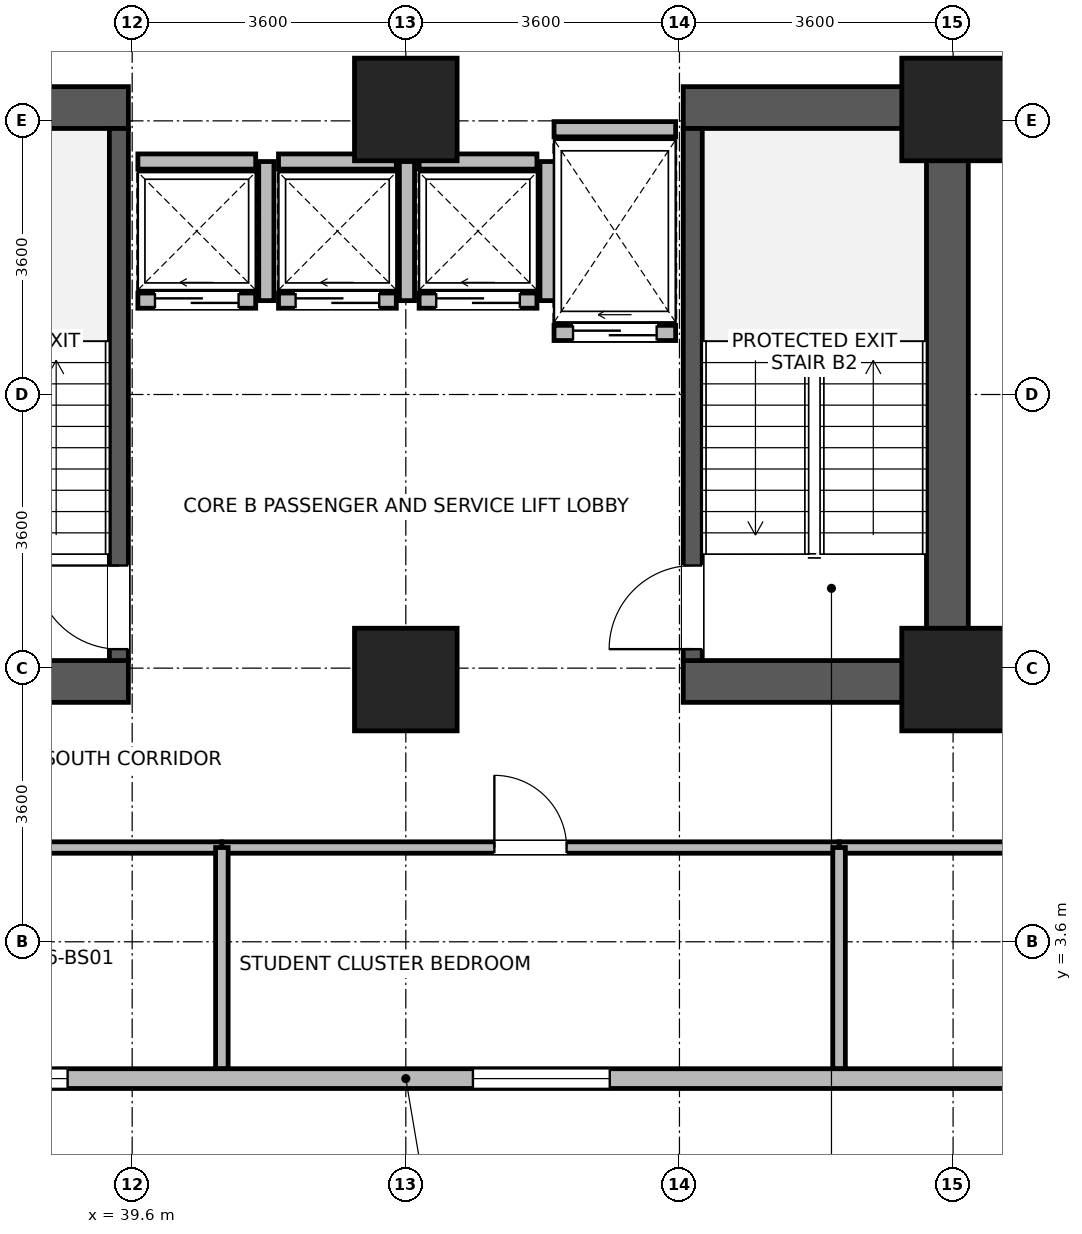
"""IFC4 building model, lengths in metres.
Left out: names, types, materials, properties, quantities, classifications, styles, units other than length and angle.
Written with IfcOpenShell. Run it as: python <this file> out.ifc"""

import sys

from ifc_helpers import new_model, si_unit, direction, frame, frame_2d, origin, origin_2d, place, context, subcontext, project, spatial, rectangle, extrude, source, transform, mapped, element, fill, save


model = new_model("IFC4")
c1 = context("Model", 3, precision=1e-05, world=origin(), true_north=direction((0.0, 1.0)))
c2 = subcontext(c1, "Body", "Model", "MODEL_VIEW")
j1 = project(units=[si_unit("LENGTHUNIT", "METRE"), si_unit("PLANEANGLEUNIT", "RADIAN")], contexts=[c1])
p1 = place(None, origin())
s1 = spatial("IfcSite", under=j1, at=p1, CompositionType="ELEMENT")
p2 = place(p1, origin())
s2 = spatial("IfcBuilding", under=s1, at=p2, CompositionType="ELEMENT")
p3 = place(p2, frame((0.0, 0.0, 29.0)))
s3 = spatial("IfcBuildingStorey", under=s2, at=p3, CompositionType="ELEMENT", Elevation=29.0)
p4 = place(p3, frame((50.325, 6.75, 0.0), z_axis=(0.0, 0.0, 1.0), x_axis=(0.0, 1.0, 0.0)))
e1 = element("IfcWall", 1, at=p4, inside=s3, PredefinedType="SHEAR", context=c2, shape_type="SweptSolid", body=[
    extrude(rectangle(XDim=8.1, YDim=0.55, at=frame_2d((4.05, 0.0))), origin(), (0.0, 0.0, 1.0), 3.45),
])
for number, where, z_axis, x_axis in (
    (2, (36.35, 7.025, 0.0), (0.0, 0.0, 1.0), (1.0, 0.0, 0.0)),
    (3, (46.85, 7.025, 0.0), (0.0, 0.0, 1.0), (1.0, 0.0, 0.0)),
    (4, (36.35, 14.575, 0.0), (0.0, 0.0, 1.0), (1.0, 0.0, 0.0)),
    (5, (46.85, 14.575, 0.0), (0.0, 0.0, 1.0), (1.0, 0.0, 0.0)),
):
    element("IfcWall", number, at=place(p3, frame(where, z_axis=z_axis, x_axis=x_axis)), inside=s3, PredefinedType="SHEAR", context=c2, shape_type="SweptSolid", body=[
        extrude(rectangle(XDim=3.2, YDim=0.55, at=frame_2d((1.6, 0.0))), origin(), (0.0, 0.0, 1.0), 3.45),
    ])
p5 = place(p3, frame((39.425, 7.3, 0.0), z_axis=(0.0, 0.0, 1.0), x_axis=(0.0, 1.0, 0.0)))
e6 = element("IfcWall", 6, at=p5, inside=s3, PredefinedType="SHEAR", context=c2, shape_type="SweptSolid", body=[
    extrude(rectangle(XDim=7.0, YDim=0.25, at=frame_2d((3.5, 0.0))), origin(), (0.0, 0.0, 1.0), 3.45),
])
p6 = place(p5, frame((0.15, 0.0, 0.0)))
e7 = element("IfcOpeningElement", 7, at=p6, cuts=e6, PredefinedType="OPENING", context=c2, shape_type="SweptSolid", body=[
    extrude(rectangle(XDim=1.1, YDim=2.08, at=frame_2d((0.55, 1.04))), frame((0.0, 0.135, 0.0), z_axis=(0.0, -1.0, 0.0), x_axis=(1.0, 0.0, 0.0)), (0.0, 0.0, 1.0), 0.27),
])
p7 = place(p3, frame((46.975, 7.3, 0.0), z_axis=(0.0, 0.0, 1.0), x_axis=(0.0, 1.0, 0.0)))
e8 = element("IfcWall", 8, at=p7, inside=s3, PredefinedType="SHEAR", context=c2, shape_type="SweptSolid", body=[
    extrude(rectangle(XDim=7.0, YDim=0.25, at=frame_2d((3.5, 0.0))), origin(), (0.0, 0.0, 1.0), 3.45),
])
p8 = place(p7, frame((0.15, 0.0, 0.0)))
e9 = element("IfcOpeningElement", 9, at=p8, cuts=e8, PredefinedType="OPENING", context=c2, shape_type="SweptSolid", body=[
    extrude(rectangle(XDim=1.1, YDim=2.08, at=frame_2d((0.55, 1.04))), frame((0.0, 0.135, 0.0), z_axis=(0.0, -1.0, 0.0), x_axis=(1.0, 0.0, 0.0)), (0.0, 0.0, 1.0), 0.27),
])
m1 = source(origin(), c2, "Body", "SweptSolid", [
    extrude(rectangle(XDim=1.35, YDim=1.35, at=origin_2d()), origin(), (0.0, 0.0, 1.0), 3.7),
])
for number, where, z_axis, x_axis in (
    (10, (43.2, 7.05, 0.0), (0.0, 0.0, 1.0), (1.0, 0.0, 0.0)),
    (11, (43.2, 14.55, 0.0), (0.0, 0.0, 1.0), (1.0, 0.0, 0.0)),
    (12, (50.4, 7.05, 0.0), (0.0, 0.0, 1.0), (1.0, 0.0, 0.0)),
    (13, (50.4, 14.55, 0.0), (0.0, 0.0, 1.0), (1.0, 0.0, 0.0)),
):
    element("IfcColumn", number, at=place(p3, frame(where, z_axis=z_axis, x_axis=x_axis)), inside=s3, PredefinedType="COLUMN", context=c2, shape_type="MappedRepresentation", body=[
        mapped(m1, transform((0.0, 0.0, 0.0), x_axis=(1.0, 0.0, 0.0), y_axis=(0.0, 1.0, 0.0), z_axis=(0.0, 0.0, 1.0), scale=1.0)),
    ])
p9 = place(p3, frame((57.465, 1.8, 0.0), z_axis=(0.0, 0.0, 1.0), x_axis=(-1.0, 0.0, 0.0)))
e14 = element("IfcWall", 14, at=p9, inside=s3, PredefinedType="STANDARD", context=c2, shape_type="SweptSolid", body=[
    extrude(rectangle(XDim=28.53, YDim=0.26, at=frame_2d((14.265, 0.0))), origin(), (0.0, 0.0, 1.0), 3.43),
])
p10 = place(p9, frame((0.883, 0.0, 0.85)))
e15 = element("IfcOpeningElement", 15, at=p10, cuts=e14, PredefinedType="OPENING", context=c2, shape_type="SweptSolid", body=[
    extrude(rectangle(XDim=1.8, YDim=1.85, at=frame_2d((0.9, 0.925))), frame((0.0, 0.14, 0.0), z_axis=(0.0, -1.0, 0.0), x_axis=(1.0, 0.0, 0.0)), (0.0, 0.0, 1.0), 0.28),
])
p11 = place(p9, frame((4.449, 0.0, 0.85)))
e16 = element("IfcOpeningElement", 16, at=p11, cuts=e14, PredefinedType="OPENING", context=c2, shape_type="SweptSolid", body=[
    extrude(rectangle(XDim=1.8, YDim=1.85, at=frame_2d((0.9, 0.925))), frame((0.0, 0.14, 0.0), z_axis=(0.0, -1.0, 0.0), x_axis=(1.0, 0.0, 0.0)), (0.0, 0.0, 1.0), 0.28),
])
p12 = place(p9, frame((11.582, 0.0, 0.85)))
e17 = element("IfcOpeningElement", 17, at=p12, cuts=e14, PredefinedType="OPENING", context=c2, shape_type="SweptSolid", body=[
    extrude(rectangle(XDim=1.8, YDim=1.85, at=frame_2d((0.9, 0.925))), frame((0.0, 0.14, 0.0), z_axis=(0.0, -1.0, 0.0), x_axis=(1.0, 0.0, 0.0)), (0.0, 0.0, 1.0), 0.28),
])
p13 = place(p9, frame((18.714, 0.0, 0.85)))
e18 = element("IfcOpeningElement", 18, at=p13, cuts=e14, PredefinedType="OPENING", context=c2, shape_type="SweptSolid", body=[
    extrude(rectangle(XDim=1.8, YDim=1.85, at=frame_2d((0.9, 0.925))), frame((0.0, 0.14, 0.0), z_axis=(0.0, -1.0, 0.0), x_axis=(1.0, 0.0, 0.0)), (0.0, 0.0, 1.0), 0.28),
])
p14 = place(p9, frame((22.281, 0.0, 0.85)))
e19 = element("IfcOpeningElement", 19, at=p14, cuts=e14, PredefinedType="OPENING", context=c2, shape_type="SweptSolid", body=[
    extrude(rectangle(XDim=1.8, YDim=1.85, at=frame_2d((0.9, 0.925))), frame((0.0, 0.14, 0.0), z_axis=(0.0, -1.0, 0.0), x_axis=(1.0, 0.0, 0.0)), (0.0, 0.0, 1.0), 0.28),
])
p15 = place(p9, frame((25.847, 0.0, 0.85)))
e20 = element("IfcOpeningElement", 20, at=p15, cuts=e14, PredefinedType="OPENING", context=c2, shape_type="SweptSolid", body=[
    extrude(rectangle(XDim=1.8, YDim=1.85, at=frame_2d((0.9, 0.925))), frame((0.0, 0.14, 0.0), z_axis=(0.0, -1.0, 0.0), x_axis=(1.0, 0.0, 0.0)), (0.0, 0.0, 1.0), 0.28),
])
p16 = place(p3, frame((39.675, 12.035, 0.0), z_axis=(0.0, 0.0, 1.0), x_axis=(1.0, 0.0, 0.0)))
e21 = element("IfcWall", 21, at=p16, inside=s3, PredefinedType="PARTITIONING", context=c2, shape_type="SweptSolid", body=[
    extrude(rectangle(XDim=1.55, YDim=0.2, at=frame_2d((0.775, 0.0))), origin(), (0.0, 0.0, 1.0), 3.43),
])
p17 = place(p16, frame((0.225, 0.0, 0.0)))
e22 = element("IfcOpeningElement", 22, at=p17, cuts=e21, PredefinedType="OPENING", context=c2, shape_type="SweptSolid", body=[
    extrude(rectangle(XDim=1.1, YDim=2.12, at=frame_2d((0.55, 1.06))), frame((0.0, 0.11, 0.0), z_axis=(0.0, -1.0, 0.0), x_axis=(1.0, 0.0, 0.0)), (0.0, 0.0, 1.0), 0.22),
])
p18 = place(p3, frame((39.675, 13.865, 0.0), z_axis=(0.0, 0.0, 1.0), x_axis=(1.0, 0.0, 0.0)))
e23 = element("IfcWall", 23, at=p18, inside=s3, PredefinedType="PARTITIONING", context=c2, shape_type="SweptSolid", body=[
    extrude(rectangle(XDim=1.55, YDim=0.2, at=frame_2d((0.775, 0.0))), origin(), (0.0, 0.0, 1.0), 3.43),
])
p19 = place(p3, frame((41.365, 12.035, 0.0), z_axis=(0.0, 0.0, 1.0), x_axis=(0.0, 1.0, 0.0)))
e24 = element("IfcWall", 24, at=p19, inside=s3, PredefinedType="PARTITIONING", context=c2, shape_type="SweptSolid", body=[
    extrude(rectangle(XDim=1.83, YDim=0.2, at=frame_2d((0.915, 0.0))), origin(), (0.0, 0.0, 1.0), 3.43),
])
p20 = place(p3, frame((41.525, 12.035, 0.0), z_axis=(0.0, 0.0, 1.0), x_axis=(1.0, 0.0, 0.0)))
e25 = element("IfcWall", 25, at=p20, inside=s3, PredefinedType="PARTITIONING", context=c2, shape_type="SweptSolid", body=[
    extrude(rectangle(XDim=1.55, YDim=0.2, at=frame_2d((0.775, 0.0))), origin(), (0.0, 0.0, 1.0), 3.43),
])
p21 = place(p20, frame((0.225, 0.0, 0.0)))
e26 = element("IfcOpeningElement", 26, at=p21, cuts=e25, PredefinedType="OPENING", context=c2, shape_type="SweptSolid", body=[
    extrude(rectangle(XDim=1.1, YDim=2.12, at=frame_2d((0.55, 1.06))), frame((0.0, 0.11, 0.0), z_axis=(0.0, -1.0, 0.0), x_axis=(1.0, 0.0, 0.0)), (0.0, 0.0, 1.0), 0.22),
])
p22 = place(p3, frame((41.525, 13.865, 0.0), z_axis=(0.0, 0.0, 1.0), x_axis=(1.0, 0.0, 0.0)))
e27 = element("IfcWall", 27, at=p22, inside=s3, PredefinedType="PARTITIONING", context=c2, shape_type="SweptSolid", body=[
    extrude(rectangle(XDim=1.55, YDim=0.2, at=frame_2d((0.775, 0.0))), origin(), (0.0, 0.0, 1.0), 3.43),
])
p23 = place(p3, frame((43.215, 12.035, 0.0), z_axis=(0.0, 0.0, 1.0), x_axis=(0.0, 1.0, 0.0)))
e28 = element("IfcWall", 28, at=p23, inside=s3, PredefinedType="PARTITIONING", context=c2, shape_type="SweptSolid", body=[
    extrude(rectangle(XDim=1.83, YDim=0.2, at=frame_2d((0.915, 0.0))), origin(), (0.0, 0.0, 1.0), 3.43),
])
p24 = place(p3, frame((43.375, 12.035, 0.0), z_axis=(0.0, 0.0, 1.0), x_axis=(1.0, 0.0, 0.0)))
e29 = element("IfcWall", 29, at=p24, inside=s3, PredefinedType="PARTITIONING", context=c2, shape_type="SweptSolid", body=[
    extrude(rectangle(XDim=1.55, YDim=0.2, at=frame_2d((0.775, 0.0))), origin(), (0.0, 0.0, 1.0), 3.43),
])
p25 = place(p24, frame((0.225, 0.0, 0.0)))
e30 = element("IfcOpeningElement", 30, at=p25, cuts=e29, PredefinedType="OPENING", context=c2, shape_type="SweptSolid", body=[
    extrude(rectangle(XDim=1.1, YDim=2.12, at=frame_2d((0.55, 1.06))), frame((0.0, 0.11, 0.0), z_axis=(0.0, -1.0, 0.0), x_axis=(1.0, 0.0, 0.0)), (0.0, 0.0, 1.0), 0.22),
])
p26 = place(p3, frame((43.375, 13.865, 0.0), z_axis=(0.0, 0.0, 1.0), x_axis=(1.0, 0.0, 0.0)))
e31 = element("IfcWall", 31, at=p26, inside=s3, PredefinedType="PARTITIONING", context=c2, shape_type="SweptSolid", body=[
    extrude(rectangle(XDim=1.55, YDim=0.2, at=frame_2d((0.775, 0.0))), origin(), (0.0, 0.0, 1.0), 3.43),
])
p27 = place(p3, frame((45.065, 12.035, 0.0), z_axis=(0.0, 0.0, 1.0), x_axis=(0.0, 1.0, 0.0)))
e32 = element("IfcWall", 32, at=p27, inside=s3, PredefinedType="PARTITIONING", context=c2, shape_type="SweptSolid", body=[
    extrude(rectangle(XDim=1.83, YDim=0.2, at=frame_2d((0.915, 0.0))), origin(), (0.0, 0.0, 1.0), 3.43),
])
p28 = place(p3, frame((45.15, 11.61, 0.0), z_axis=(0.0, 0.0, 1.0), x_axis=(1.0, 0.0, 0.0)))
e33 = element("IfcWall", 33, at=p28, inside=s3, PredefinedType="PARTITIONING", context=c2, shape_type="SweptSolid", body=[
    extrude(rectangle(XDim=1.6, YDim=0.2, at=frame_2d((0.8, 0.0))), origin(), (0.0, 0.0, 1.0), 3.43),
])
p29 = place(p28, frame((0.25, 0.0, 0.0)))
e34 = element("IfcOpeningElement", 34, at=p29, cuts=e33, PredefinedType="OPENING", context=c2, shape_type="SweptSolid", body=[
    extrude(rectangle(XDim=1.1, YDim=2.12, at=frame_2d((0.55, 1.06))), frame((0.0, 0.11, 0.0), z_axis=(0.0, -1.0, 0.0), x_axis=(1.0, 0.0, 0.0)), (0.0, 0.0, 1.0), 0.22),
])
p30 = place(p3, frame((45.15, 14.29, 0.0), z_axis=(0.0, 0.0, 1.0), x_axis=(1.0, 0.0, 0.0)))
e35 = element("IfcWall", 35, at=p30, inside=s3, PredefinedType="PARTITIONING", context=c2, shape_type="SweptSolid", body=[
    extrude(rectangle(XDim=1.6, YDim=0.2, at=frame_2d((0.8, 0.0))), origin(), (0.0, 0.0, 1.0), 2.23),
])
p31 = place(p3, frame((28.932, 4.84, 0.0), z_axis=(0.0, 0.0, 1.0), x_axis=(1.0, 0.0, 0.0)))
e36 = element("IfcWall", 36, at=p31, inside=s3, PredefinedType="PARTITIONING", context=c2, shape_type="SweptSolid", body=[
    extrude(rectangle(XDim=11.848, YDim=0.15, at=frame_2d((5.924, 0.0))), origin(), (0.0, 0.0, 1.0), 3.43),
])
p32 = place(p31, frame((5.274, 0.0, 0.0)))
e37 = element("IfcOpeningElement", 37, at=p32, cuts=e36, PredefinedType="OPENING", context=c2, shape_type="SweptSolid", body=[
    extrude(rectangle(XDim=1.3, YDim=2.12, at=frame_2d((0.65, 1.06))), frame((0.0, 0.085, 0.0), z_axis=(0.0, -1.0, 0.0), x_axis=(1.0, 0.0, 0.0)), (0.0, 0.0, 1.0), 0.17),
])
p33 = place(p3, frame((48.9, 4.84, 0.0), z_axis=(0.0, 0.0, 1.0), x_axis=(1.0, 0.0, 0.0)))
e38 = element("IfcWall", 38, at=p33, inside=s3, PredefinedType="PARTITIONING", context=c2, shape_type="SweptSolid", body=[
    extrude(rectangle(XDim=8.568, YDim=0.15, at=frame_2d((4.284, 0.0))), origin(), (0.0, 0.0, 1.0), 3.43),
])
p34 = place(p33, frame((3.809, 0.0, 0.0)))
e39 = element("IfcOpeningElement", 39, at=p34, cuts=e38, PredefinedType="OPENING", context=c2, shape_type="SweptSolid", body=[
    extrude(rectangle(XDim=0.95, YDim=2.1, at=frame_2d((0.475, 1.05))), frame((0.0, 0.085, 0.0), z_axis=(0.0, -1.0, 0.0), x_axis=(1.0, 0.0, 0.0)), (0.0, 0.0, 1.0), 0.17),
])
p35 = place(p3, frame((40.78, 4.84, 0.0), z_axis=(0.0, 0.0, 1.0), x_axis=(1.0, 0.0, 0.0)))
e40 = element("IfcWall", 40, at=p35, inside=s3, PredefinedType="PARTITIONING", context=c2, shape_type="SweptSolid", body=[
    extrude(rectangle(XDim=8.12, YDim=0.15, at=frame_2d((4.06, 0.0))), origin(), (0.0, 0.0, 1.0), 3.43),
])
p36 = place(p35, frame((3.585, 0.0, 0.0)))
e41 = element("IfcOpeningElement", 41, at=p36, cuts=e40, PredefinedType="OPENING", context=c2, shape_type="SweptSolid", body=[
    extrude(rectangle(XDim=0.95, YDim=2.1, at=frame_2d((0.475, 1.05))), frame((0.0, 0.085, 0.0), z_axis=(0.0, -1.0, 0.0), x_axis=(1.0, 0.0, 0.0)), (0.0, 0.0, 1.0), 0.17),
])
for number, where, z_axis, x_axis in (
    (42, (40.78, 1.932, 0.0), (0.0, 0.0, 1.0), (0.0, 1.0, 0.0)),
    (43, (48.9, 1.932, 0.0), (0.0, 0.0, 1.0), (0.0, 1.0, 0.0)),
):
    element("IfcWall", number, at=place(p3, frame(where, z_axis=z_axis, x_axis=x_axis)), inside=s3, PredefinedType="PARTITIONING", context=c2, shape_type="SweptSolid", body=[
        extrude(rectangle(XDim=2.908, YDim=0.165, at=frame_2d((1.454, 0.0))), origin(), (0.0, 0.0, 1.0), 3.43),
    ])
p37 = place(p12, origin())
e44 = element("IfcWindow", 44, at=p37, inside=s3, PartitioningType="SINGLE_PANEL", PredefinedType="WINDOW", context=c2, shape_type="SweptSolid", body=[
    extrude(rectangle(XDim=1.8, YDim=1.85, at=frame_2d((0.9, 0.925))), frame((0.0, 0.03, 0.0), z_axis=(0.0, -1.0, 0.0), x_axis=(1.0, 0.0, 0.0)), (0.0, 0.0, 1.0), 0.06),
])
fill(e17, e44)
p38 = place(p13, origin())
e45 = element("IfcWindow", 45, at=p38, inside=s3, PartitioningType="SINGLE_PANEL", PredefinedType="WINDOW", context=c2, shape_type="SweptSolid", body=[
    extrude(rectangle(XDim=1.8, YDim=1.85, at=frame_2d((0.9, 0.925))), frame((0.0, 0.03, 0.0), z_axis=(0.0, -1.0, 0.0), x_axis=(1.0, 0.0, 0.0)), (0.0, 0.0, 1.0), 0.06),
])
fill(e18, e45)
p39 = place(p6, origin())
e46 = element("IfcDoor", 46, at=p39, inside=s3, OperationType="SINGLE_SWING_RIGHT", PredefinedType="DOOR", context=c2, shape_type="SweptSolid", body=[
    extrude(rectangle(XDim=1.1, YDim=2.08, at=frame_2d((0.55, 1.04))), frame((0.0, 0.025, 0.0), z_axis=(0.0, -1.0, 0.0), x_axis=(1.0, 0.0, 0.0)), (0.0, 0.0, 1.0), 0.05),
])
fill(e7, e46)
p40 = place(p8, origin())
e47 = element("IfcDoor", 47, at=p40, inside=s3, OperationType="SINGLE_SWING_LEFT", PredefinedType="DOOR", context=c2, shape_type="SweptSolid", body=[
    extrude(rectangle(XDim=1.1, YDim=2.08, at=frame_2d((0.55, 1.04))), frame((0.0, 0.025, 0.0), z_axis=(0.0, -1.0, 0.0), x_axis=(1.0, 0.0, 0.0)), (0.0, 0.0, 1.0), 0.05),
])
fill(e9, e47)
p41 = place(p17, origin())
e48 = element("IfcDoor", 48, at=p41, inside=s3, OperationType="SLIDING_TO_LEFT", PredefinedType="DOOR", context=c2, shape_type="SweptSolid", body=[
    extrude(rectangle(XDim=1.1, YDim=2.12, at=frame_2d((0.55, 1.06))), frame((0.0, 0.025, 0.0), z_axis=(0.0, -1.0, 0.0), x_axis=(1.0, 0.0, 0.0)), (0.0, 0.0, 1.0), 0.05),
])
fill(e22, e48)
p42 = place(p21, origin())
e49 = element("IfcDoor", 49, at=p42, inside=s3, OperationType="SLIDING_TO_LEFT", PredefinedType="DOOR", context=c2, shape_type="SweptSolid", body=[
    extrude(rectangle(XDim=1.1, YDim=2.12, at=frame_2d((0.55, 1.06))), frame((0.0, 0.025, 0.0), z_axis=(0.0, -1.0, 0.0), x_axis=(1.0, 0.0, 0.0)), (0.0, 0.0, 1.0), 0.05),
])
fill(e26, e49)
p43 = place(p25, origin())
e50 = element("IfcDoor", 50, at=p43, inside=s3, OperationType="SLIDING_TO_LEFT", PredefinedType="DOOR", context=c2, shape_type="SweptSolid", body=[
    extrude(rectangle(XDim=1.1, YDim=2.12, at=frame_2d((0.55, 1.06))), frame((0.0, 0.025, 0.0), z_axis=(0.0, -1.0, 0.0), x_axis=(1.0, 0.0, 0.0)), (0.0, 0.0, 1.0), 0.05),
])
fill(e30, e50)
p44 = place(p29, origin())
e51 = element("IfcDoor", 51, at=p44, inside=s3, OperationType="SLIDING_TO_LEFT", PredefinedType="DOOR", context=c2, shape_type="SweptSolid", body=[
    extrude(rectangle(XDim=1.1, YDim=2.12, at=frame_2d((0.55, 1.06))), frame((0.0, 0.025, 0.0), z_axis=(0.0, -1.0, 0.0), x_axis=(1.0, 0.0, 0.0)), (0.0, 0.0, 1.0), 0.05),
])
fill(e34, e51)
p45 = place(p36, origin())
e52 = element("IfcDoor", 52, at=p45, inside=s3, OperationType="SINGLE_SWING_LEFT", PredefinedType="DOOR", context=c2, shape_type="SweptSolid", body=[
    extrude(rectangle(XDim=0.95, YDim=2.1, at=frame_2d((0.475, 1.05))), frame((0.0, 0.025, 0.0), z_axis=(0.0, -1.0, 0.0), x_axis=(1.0, 0.0, 0.0)), (0.0, 0.0, 1.0), 0.05),
])
fill(e41, e52)
save(model, sys.argv[1])
